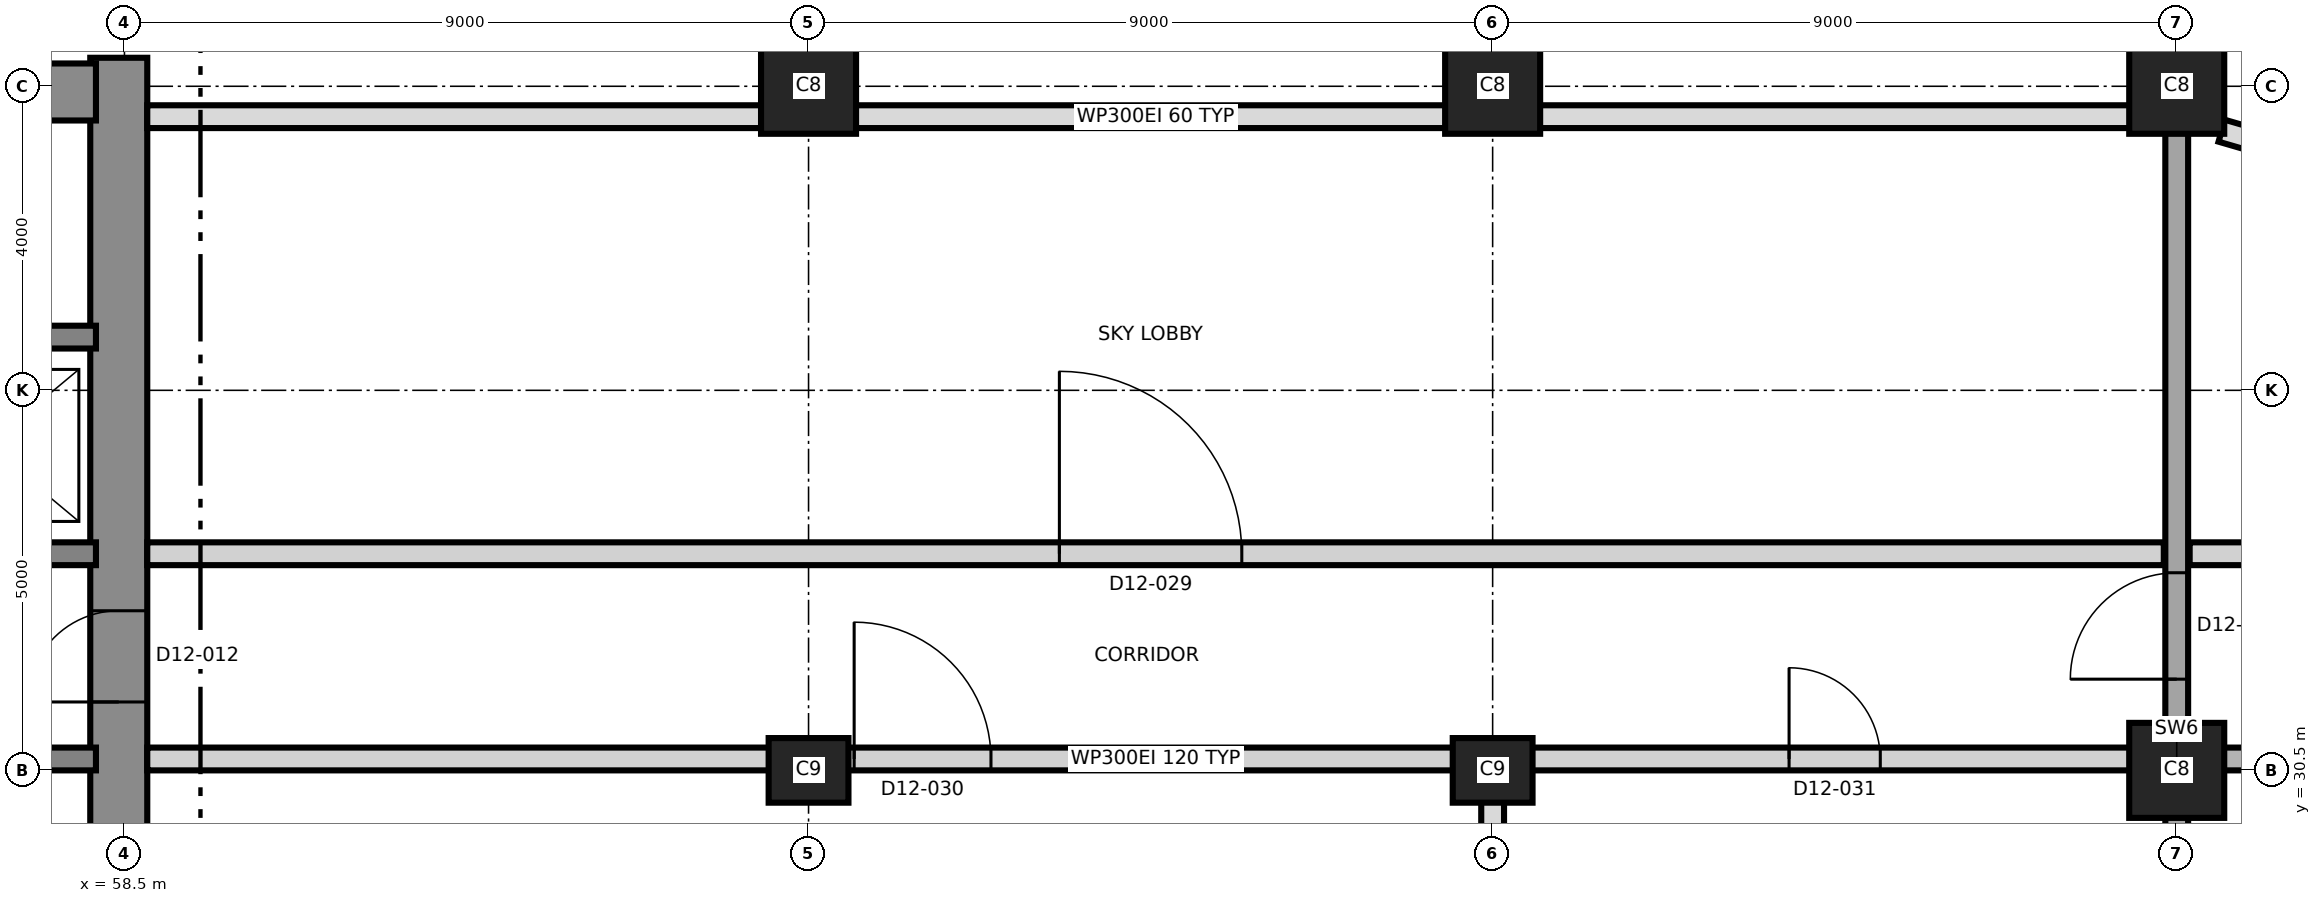
"""IFC4 building model, lengths in metres.
Left out: names, types, materials, properties, quantities, classifications, styles, units other than length and angle.
Written with IfcOpenShell. Run it as: python <this file> out.ifc"""

import sys

from ifc_helpers import new_model, si_unit, direction, frame, frame_2d, origin, origin_2d, place, context, subcontext, project, spatial, rectangle, extrude, element, fill, save


model = new_model("IFC4")
c1 = context("Model", 3, precision=1e-05, world=origin(), true_north=direction((0.0, 1.0)))
c2 = subcontext(c1, "Body", "Model", "MODEL_VIEW")
j1 = project(units=[si_unit("LENGTHUNIT", "METRE"), si_unit("PLANEANGLEUNIT", "RADIAN")], contexts=[c1])
p1 = place(None, origin())
s1 = spatial("IfcSite", under=j1, at=p1, CompositionType="ELEMENT")
p2 = place(p1, origin())
s2 = spatial("IfcBuilding", under=s1, at=p2, CompositionType="ELEMENT")
p3 = place(p2, frame((0.0, 0.0, 135.2)))
s3 = spatial("IfcBuildingStorey", under=s2, at=p3, CompositionType="ELEMENT", Elevation=135.2)
p4 = place(p3, frame((58.425, 21.125, 0.0), z_axis=(0.0, 0.0, 1.0), x_axis=(0.0, 1.0, 0.0)))
e1 = element("IfcWall", 1, at=p4, inside=s3, PredefinedType="SHEAR", context=c2, shape_type="SweptSolid", body=[
    extrude(rectangle(XDim=18.75, YDim=0.75, at=frame_2d((9.375, 0.0))), origin(), (0.0, 0.0, 1.0), 7.0),
])
p5 = place(p4, frame((10.275, 0.0, 0.0)))
e2 = element("IfcOpeningElement", 2, at=p5, cuts=e1, PredefinedType="OPENING", context=c2, shape_type="SweptSolid", body=[
    extrude(rectangle(XDim=1.2, YDim=2.1, at=frame_2d((0.6, 1.05))), frame((0.0, 0.385, 0.0), z_axis=(0.0, -1.0, 0.0), x_axis=(1.0, 0.0, 0.0)), (0.0, 0.0, 1.0), 0.77),
])
p6 = place(p3, frame((31.125, 39.425, 0.0), z_axis=(0.0, 0.0, 1.0), x_axis=(1.0, 0.0, 0.0)))
e3 = element("IfcWall", 3, at=p6, inside=s3, PredefinedType="SHEAR", context=c2, shape_type="SweptSolid", body=[
    extrude(rectangle(XDim=27.0, YDim=0.75, at=frame_2d((13.5, 0.0))), origin(), (0.0, 0.0, 1.0), 7.0),
])
p7 = place(p6, frame((10.575, 0.0, 0.0)))
e4 = element("IfcOpeningElement", 4, at=p7, cuts=e3, PredefinedType="OPENING", context=c2, shape_type="SweptSolid", body=[
    extrude(rectangle(XDim=1.2, YDim=2.1, at=frame_2d((0.6, 1.05))), frame((0.0, 0.385, 0.0), z_axis=(0.0, -1.0, 0.0), x_axis=(1.0, 0.0, 0.0)), (0.0, 0.0, 1.0), 0.77),
])
p8 = place(p3, frame((31.875, 30.65, 0.0), z_axis=(0.0, 0.0, 1.0), x_axis=(1.0, 0.0, 0.0)))
e5 = element("IfcWall", 5, at=p8, inside=s3, PredefinedType="SHEAR", context=c2, shape_type="SweptSolid", body=[
    extrude(rectangle(XDim=26.25, YDim=0.3, at=frame_2d((13.125, 0.0))), origin(), (0.0, 0.0, 1.0), 7.0),
])
p9 = place(p8, frame((24.625, 0.0, 0.0)))
e6 = element("IfcOpeningElement", 6, at=p9, cuts=e5, PredefinedType="OPENING", context=c2, shape_type="SweptSolid", body=[
    extrude(rectangle(XDim=1.0, YDim=2.1, at=frame_2d((0.5, 1.05))), frame((0.0, 0.16, 0.0), z_axis=(0.0, -1.0, 0.0), x_axis=(1.0, 0.0, 0.0)), (0.0, 0.0, 1.0), 0.32),
])
p10 = place(p3, frame((31.875, 33.35, 0.0), z_axis=(0.0, 0.0, 1.0), x_axis=(1.0, 0.0, 0.0)))
e7 = element("IfcWall", 7, at=p10, inside=s3, PredefinedType="SHEAR", context=c2, shape_type="SweptSolid", body=[
    extrude(rectangle(XDim=26.25, YDim=0.3, at=frame_2d((13.125, 0.0))), origin(), (0.0, 0.0, 1.0), 7.0),
])
p11 = place(p10, frame((13.775, 0.0, 0.0)))
e8 = element("IfcOpeningElement", 8, at=p11, cuts=e7, PredefinedType="OPENING", context=c2, shape_type="SweptSolid", body=[
    extrude(rectangle(XDim=1.4, YDim=2.1, at=frame_2d((0.7, 1.05))), frame((0.0, 0.16, 0.0), z_axis=(0.0, -1.0, 0.0), x_axis=(1.0, 0.0, 0.0)), (0.0, 0.0, 1.0), 0.32),
])
p12 = place(p10, frame((5.25, 0.0, 0.0)))
e9 = element("IfcOpeningElement", 9, at=p12, cuts=e7, PredefinedType="OPENING", context=c2, shape_type="SweptSolid", body=[
    extrude(rectangle(XDim=1.2, YDim=2.1, at=frame_2d((0.6, 1.05))), frame((0.0, 0.16, 0.0), z_axis=(0.0, -1.0, 0.0), x_axis=(1.0, 0.0, 0.0)), (0.0, 0.0, 1.0), 0.32),
])
p13 = place(p10, frame((19.8, 0.0, 0.0)))
e10 = element("IfcOpeningElement", 10, at=p13, cuts=e7, PredefinedType="OPENING", context=c2, shape_type="SweptSolid", body=[
    extrude(rectangle(XDim=1.2, YDim=2.1, at=frame_2d((0.6, 1.05))), frame((0.0, 0.16, 0.0), z_axis=(0.0, -1.0, 0.0), x_axis=(1.0, 0.0, 0.0)), (0.0, 0.0, 1.0), 0.32),
])
p14 = place(p3, frame((43.5, 36.2, 0.0), z_axis=(0.0, 0.0, 1.0), x_axis=(1.0, 0.0, 0.0)))
e11 = element("IfcWall", 11, at=p14, inside=s3, PredefinedType="SHEAR", context=c2, shape_type="SweptSolid", body=[
    extrude(rectangle(XDim=14.625, YDim=0.3, at=frame_2d((7.312, 0.0))), origin(), (0.0, 0.0, 1.0), 7.0),
])
p15 = place(p14, frame((6.9, 0.0, 0.0)))
e12 = element("IfcOpeningElement", 12, at=p15, cuts=e11, PredefinedType="OPENING", context=c2, shape_type="SweptSolid", body=[
    extrude(rectangle(XDim=1.2, YDim=2.1, at=frame_2d((0.6, 1.05))), frame((0.0, 0.16, 0.0), z_axis=(0.0, -1.0, 0.0), x_axis=(1.0, 0.0, 0.0)), (0.0, 0.0, 1.0), 0.32),
])
p16 = place(p14, frame((0.7, 0.0, 0.0)))
e13 = element("IfcOpeningElement", 13, at=p16, cuts=e11, PredefinedType="OPENING", context=c2, shape_type="SweptSolid", body=[
    extrude(rectangle(XDim=1.3, YDim=2.4, at=frame_2d((0.65, 1.2))), frame((0.0, 0.16, 0.0), z_axis=(0.0, -1.0, 0.0), x_axis=(1.0, 0.0, 0.0)), (0.0, 0.0, 1.0), 0.32),
])
p17 = place(p14, frame((3.7, 0.0, 0.0)))
e14 = element("IfcOpeningElement", 14, at=p17, cuts=e11, PredefinedType="OPENING", context=c2, shape_type="SweptSolid", body=[
    extrude(rectangle(XDim=1.3, YDim=2.4, at=frame_2d((0.65, 1.2))), frame((0.0, 0.16, 0.0), z_axis=(0.0, -1.0, 0.0), x_axis=(1.0, 0.0, 0.0)), (0.0, 0.0, 1.0), 0.32),
])
for number, where, z_axis, x_axis in (
    (15, (67.5, 30.5, 0.0), (0.0, 0.0, 1.0), (1.0, 0.0, 0.0)),
    (16, (76.5, 30.5, 0.0), (0.0, 0.0, 1.0), (1.0, 0.0, 0.0)),
):
    element("IfcColumn", number, at=place(p3, frame(where, z_axis=z_axis, x_axis=x_axis)), inside=s3, PredefinedType="COLUMN", context=c2, shape_type="SweptSolid", body=[
        extrude(rectangle(XDim=1.05, YDim=0.85, at=origin_2d()), origin(), (0.0, 0.0, 1.0), 7.0),
    ])
for number, where, z_axis, x_axis in (
    (17, (85.5, 30.5, 0.0), (0.0, 0.0, 1.0), (1.0, 0.0, 0.0)),
    (18, (67.5, 39.5, 0.0), (0.0, 0.0, 1.0), (1.0, 0.0, 0.0)),
    (19, (76.5, 39.5, 0.0), (0.0, 0.0, 1.0), (1.0, 0.0, 0.0)),
    (20, (85.5, 39.5, 0.0), (0.0, 0.0, 1.0), (1.0, 0.0, 0.0)),
):
    element("IfcColumn", number, at=place(p3, frame(where, z_axis=z_axis, x_axis=x_axis)), inside=s3, PredefinedType="COLUMN", context=c2, shape_type="SweptSolid", body=[
        extrude(rectangle(XDim=1.25, YDim=1.25, at=origin_2d()), origin(), (0.0, 0.0, 1.0), 7.0),
    ])
p18 = place(p3, frame((85.5, 20.35, 0.0), z_axis=(0.0, 0.0, 1.0), x_axis=(0.0, 1.0, 0.0)))
e21 = element("IfcWall", 21, at=p18, inside=s3, PredefinedType="SHEAR", context=c2, shape_type="SweptSolid", body=[
    extrude(rectangle(XDim=20.3, YDim=0.3, at=frame_2d((10.15, 0.0))), origin(), (0.0, 0.0, 1.0), 7.0),
])
p19 = place(p18, frame((11.35, 0.0, 0.0)))
e22 = element("IfcOpeningElement", 22, at=p19, cuts=e21, PredefinedType="OPENING", context=c2, shape_type="SweptSolid", body=[
    extrude(rectangle(XDim=1.4, YDim=2.1, at=frame_2d((0.7, 1.05))), frame((0.0, 0.16, 0.0), z_axis=(0.0, -1.0, 0.0), x_axis=(1.0, 0.0, 0.0)), (0.0, 0.0, 1.0), 0.32),
])
p20 = place(p3, frame((85.781, 39.693, 0.0), z_axis=(0.0, 0.0, 1.0), x_axis=(0.048421151463, -0.99882700809, 0.0)))
e23 = element("IfcWall", 23, at=p20, inside=s3, PredefinedType="PARTITIONING", context=c2, shape_type="SweptSolid", body=[
    extrude(rectangle(XDim=0.434, YDim=0.3, at=frame_2d((0.217, 0.0))), origin(), (0.0, 0.0, 1.0), 6.7),
])
p21 = place(p3, frame((86.092, 38.915, 0.0), z_axis=(0.0, 0.0, 1.0), x_axis=(0.9602069438, -0.279289500479, 0.0)))
e24 = element("IfcWall", 24, at=p21, inside=s3, PredefinedType="PARTITIONING", context=c2, shape_type="SweptSolid", body=[
    extrude(rectangle(XDim=5.622, YDim=0.3, at=frame_2d((2.811, 0.0))), origin(), (0.0, 0.0, 1.0), 6.7),
])
p22 = place(p3, frame((58.8, 30.65, 0.0), z_axis=(0.0, 0.0, 1.0), x_axis=(1.0, 0.0, 0.0)))
e25 = element("IfcWall", 25, at=p22, inside=s3, PredefinedType="PARTITIONING", context=c2, shape_type="SweptSolid", body=[
    extrude(rectangle(XDim=26.53, YDim=0.3, at=frame_2d((13.265, 0.0))), origin(), (0.0, 0.0, 1.0), 6.7),
])
p23 = place(p22, frame((9.3, 0.0, 0.0)))
e26 = element("IfcOpeningElement", 26, at=p23, cuts=e25, PredefinedType="OPENING", context=c2, shape_type="SweptSolid", body=[
    extrude(rectangle(XDim=1.8, YDim=2.1, at=frame_2d((0.9, 1.05))), frame((0.0, 0.16, 0.0), z_axis=(0.0, -1.0, 0.0), x_axis=(1.0, 0.0, 0.0)), (0.0, 0.0, 1.0), 0.32),
])
p24 = place(p22, frame((21.6, 0.0, 0.0)))
e27 = element("IfcOpeningElement", 27, at=p24, cuts=e25, PredefinedType="OPENING", context=c2, shape_type="SweptSolid", body=[
    extrude(rectangle(XDim=1.2, YDim=2.1, at=frame_2d((0.6, 1.05))), frame((0.0, 0.16, 0.0), z_axis=(0.0, -1.0, 0.0), x_axis=(1.0, 0.0, 0.0)), (0.0, 0.0, 1.0), 0.32),
])
p25 = place(p3, frame((85.67, 30.65, 0.0), z_axis=(0.0, 0.0, 1.0), x_axis=(1.0, 0.0, 0.0)))
e28 = element("IfcWall", 28, at=p25, inside=s3, PredefinedType="SHEAR", context=c2, shape_type="SweptSolid", body=[
    extrude(rectangle(XDim=8.23, YDim=0.3, at=frame_2d((4.115, 0.0))), origin(), (0.0, 0.0, 1.0), 6.7),
])
p26 = place(p25, frame((2.08, 0.0, 0.0)))
e29 = element("IfcOpeningElement", 29, at=p26, cuts=e28, PredefinedType="OPENING", context=c2, shape_type="SweptSolid", body=[
    extrude(rectangle(XDim=1.2, YDim=2.1, at=frame_2d((0.6, 1.05))), frame((0.0, 0.16, 0.0), z_axis=(0.0, -1.0, 0.0), x_axis=(1.0, 0.0, 0.0)), (0.0, 0.0, 1.0), 0.32),
])
p27 = place(p25, frame((5.63, 0.0, 0.0)))
e30 = element("IfcOpeningElement", 30, at=p27, cuts=e28, PredefinedType="OPENING", context=c2, shape_type="SweptSolid", body=[
    extrude(rectangle(XDim=1.0, YDim=2.1, at=frame_2d((0.5, 1.05))), frame((0.0, 0.16, 0.0), z_axis=(0.0, -1.0, 0.0), x_axis=(1.0, 0.0, 0.0)), (0.0, 0.0, 1.0), 0.32),
])
p28 = place(p3, frame((58.8, 33.35, 0.0), z_axis=(0.0, 0.0, 1.0), x_axis=(1.0, 0.0, 0.0)))
e31 = element("IfcWall", 31, at=p28, inside=s3, PredefinedType="PARTITIONING", context=c2, shape_type="SweptSolid", body=[
    extrude(rectangle(XDim=26.53, YDim=0.3, at=frame_2d((13.265, 0.0))), origin(), (0.0, 0.0, 1.0), 6.7),
])
p29 = place(p28, frame((12.0, 0.0, 0.0)))
e32 = element("IfcOpeningElement", 32, at=p29, cuts=e31, PredefinedType="OPENING", context=c2, shape_type="SweptSolid", body=[
    extrude(rectangle(XDim=2.4, YDim=2.4, at=frame_2d((1.2, 1.2))), frame((0.0, 0.16, 0.0), z_axis=(0.0, -1.0, 0.0), x_axis=(1.0, 0.0, 0.0)), (0.0, 0.0, 1.0), 0.32),
])
p30 = place(p3, frame((85.67, 33.35, 0.0), z_axis=(0.0, 0.0, 1.0), x_axis=(1.0, 0.0, 0.0)))
e33 = element("IfcWall", 33, at=p30, inside=s3, PredefinedType="PARTITIONING", context=c2, shape_type="SweptSolid", body=[
    extrude(rectangle(XDim=7.588, YDim=0.3, at=frame_2d((3.794, 0.0))), origin(), (0.0, 0.0, 1.0), 6.7),
])
p31 = place(p30, frame((2.73, 0.0, 0.0)))
e34 = element("IfcOpeningElement", 34, at=p31, cuts=e33, PredefinedType="OPENING", context=c2, shape_type="SweptSolid", body=[
    extrude(rectangle(XDim=1.2, YDim=2.1, at=frame_2d((0.6, 1.05))), frame((0.0, 0.16, 0.0), z_axis=(0.0, -1.0, 0.0), x_axis=(1.0, 0.0, 0.0)), (0.0, 0.0, 1.0), 0.32),
])
p32 = place(p3, frame((58.8, 39.1, 0.0), z_axis=(0.0, 0.0, 1.0), x_axis=(1.0, 0.0, 0.0)))
e35 = element("IfcWall", 35, at=p32, inside=s3, PredefinedType="PARTITIONING", context=c2, shape_type="SweptSolid", body=[
    extrude(rectangle(XDim=26.53, YDim=0.3, at=frame_2d((13.265, 0.0))), origin(), (0.0, 0.0, 1.0), 6.7),
])
p33 = place(p3, frame((76.5, 21.9, 0.0), z_axis=(0.0, 0.0, 1.0), x_axis=(0.0, 1.0, 0.0)))
e36 = element("IfcWall", 36, at=p33, inside=s3, PredefinedType="PARTITIONING", context=c2, shape_type="SweptSolid", body=[
    extrude(rectangle(XDim=8.75, YDim=0.3, at=frame_2d((4.375, 0.0))), origin(), (0.0, 0.0, 1.0), 6.7),
])
p34 = place(p5, origin())
e37 = element("IfcDoor", 37, at=p34, inside=s3, OperationType="SINGLE_SWING_LEFT", PredefinedType="DOOR", context=c2, shape_type="SweptSolid", body=[
    extrude(rectangle(XDim=1.2, YDim=2.1, at=frame_2d((0.6, 1.05))), frame((0.0, 0.025, 0.0), z_axis=(0.0, -1.0, 0.0), x_axis=(1.0, 0.0, 0.0)), (0.0, 0.0, 1.0), 0.05),
])
fill(e2, e37)
p35 = place(p29, origin())
e38 = element("IfcDoor", 38, at=p35, inside=s3, OperationType="SINGLE_SWING_LEFT", PredefinedType="DOOR", context=c2, shape_type="SweptSolid", body=[
    extrude(rectangle(XDim=2.4, YDim=2.4, at=frame_2d((1.2, 1.2))), frame((0.0, 0.025, 0.0), z_axis=(0.0, -1.0, 0.0), x_axis=(1.0, 0.0, 0.0)), (0.0, 0.0, 1.0), 0.05),
])
fill(e32, e38)
p36 = place(p23, origin())
e39 = element("IfcDoor", 39, at=p36, inside=s3, OperationType="SINGLE_SWING_LEFT", PredefinedType="DOOR", context=c2, shape_type="SweptSolid", body=[
    extrude(rectangle(XDim=1.8, YDim=2.1, at=frame_2d((0.9, 1.05))), frame((0.0, 0.025, 0.0), z_axis=(0.0, -1.0, 0.0), x_axis=(1.0, 0.0, 0.0)), (0.0, 0.0, 1.0), 0.05),
])
fill(e26, e39)
p37 = place(p24, origin())
e40 = element("IfcDoor", 40, at=p37, inside=s3, OperationType="SINGLE_SWING_LEFT", PredefinedType="DOOR", context=c2, shape_type="SweptSolid", body=[
    extrude(rectangle(XDim=1.2, YDim=2.1, at=frame_2d((0.6, 1.05))), frame((0.0, 0.025, 0.0), z_axis=(0.0, -1.0, 0.0), x_axis=(1.0, 0.0, 0.0)), (0.0, 0.0, 1.0), 0.05),
])
fill(e27, e40)
p38 = place(p19, origin())
e41 = element("IfcDoor", 41, at=p38, inside=s3, OperationType="SINGLE_SWING_RIGHT", PredefinedType="DOOR", context=c2, shape_type="SweptSolid", body=[
    extrude(rectangle(XDim=1.4, YDim=2.1, at=frame_2d((0.7, 1.05))), frame((0.0, 0.025, 0.0), z_axis=(0.0, -1.0, 0.0), x_axis=(1.0, 0.0, 0.0)), (0.0, 0.0, 1.0), 0.05),
])
fill(e22, e41)
save(model, sys.argv[1])
